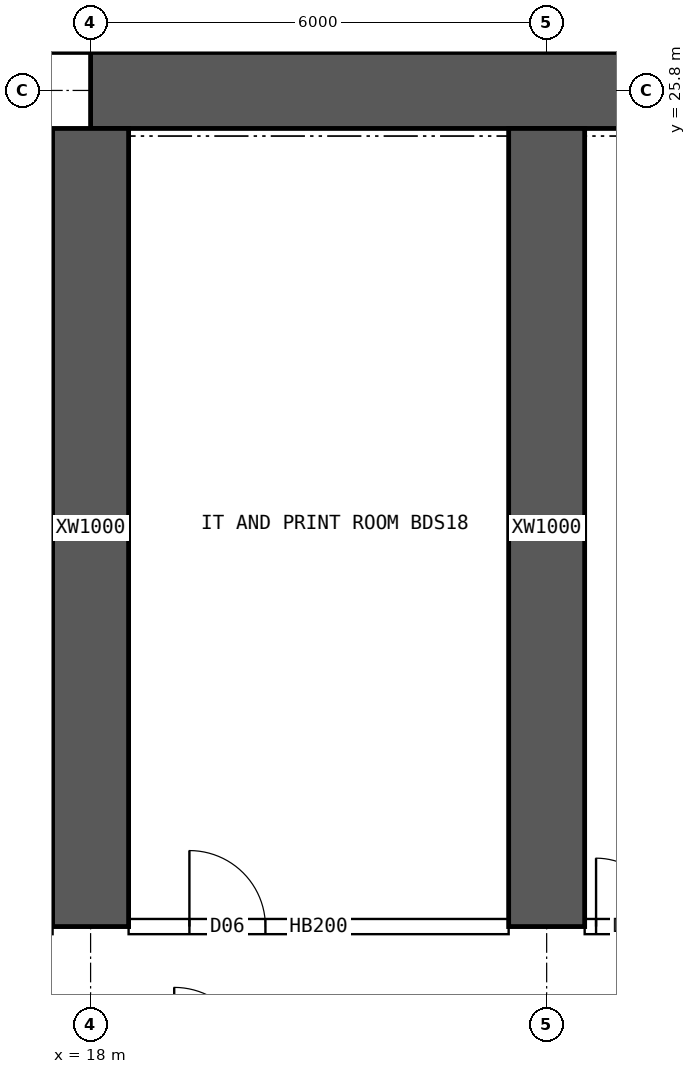
"""IFC4 building model, lengths in metres.
Left out: names, types, materials, properties, quantities, classifications, styles, units other than length and angle.
Written with IfcOpenShell. Run it as: python <this file> out.ifc"""

import sys

from ifc_helpers import new_model, si_unit, direction, frame, frame_2d, origin, place, context, subcontext, project, spatial, rectangle, extrude, element, fill, save


model = new_model("IFC4")
c1 = context("Model", 3, precision=1e-05, world=origin(), true_north=direction((0.0, 1.0)))
c2 = subcontext(c1, "Body", "Model", "MODEL_VIEW")
j1 = project(units=[si_unit("LENGTHUNIT", "METRE"), si_unit("PLANEANGLEUNIT", "RADIAN")], contexts=[c1])
p1 = place(None, origin())
s1 = spatial("IfcSite", under=j1, at=p1, CompositionType="ELEMENT")
p2 = place(p1, origin())
s2 = spatial("IfcBuilding", under=s1, at=p2, CompositionType="ELEMENT")
p3 = place(p2, frame((0.0, 0.0, 42.7)))
s3 = spatial("IfcBuildingStorey", under=s2, at=p3, CompositionType="ELEMENT", Elevation=42.7)
p4 = place(p3, frame((18.0, 25.8, 0.0), z_axis=(0.0, 0.0, 1.0), x_axis=(1.0, 0.0, 0.0)))
e1 = element("IfcWall", 1, at=p4, inside=s3, PredefinedType="SHEAR", context=c2, shape_type="SweptSolid", body=[
    extrude(rectangle(XDim=48.0, YDim=1.0, at=frame_2d((24.0, 0.0))), origin(), (0.0, 0.0, 1.0), 3.75),
])
for number, where, z_axis, x_axis in (
    (2, (18.0, 14.8, 0.0), (0.0, 0.0, 1.0), (0.0, 1.0, 0.0)),
    (3, (24.0, 14.8, 0.0), (0.0, 0.0, 1.0), (0.0, 1.0, 0.0)),
):
    element("IfcWall", number, at=place(p3, frame(where, z_axis=z_axis, x_axis=x_axis)), inside=s3, PredefinedType="SHEAR", context=c2, shape_type="SweptSolid", body=[
        extrude(rectangle(XDim=10.5, YDim=1.0, at=frame_2d((5.25, 0.0))), origin(), (0.0, 0.0, 1.0), 3.75),
    ])
p5 = place(p3, frame((18.5, 14.8, 0.0), z_axis=(0.0, 0.0, 1.0), x_axis=(1.0, 0.0, 0.0)))
e4 = element("IfcWall", 4, at=p5, inside=s3, PredefinedType="SOLIDWALL", context=c2, shape_type="SweptSolid", body=[
    extrude(rectangle(XDim=5.0, YDim=0.2, at=frame_2d((2.5, 0.0))), origin(), (0.0, 0.0, 1.0), 3.5),
])
p6 = place(p5, frame((0.8, 0.0, 0.0)))
e5 = element("IfcOpeningElement", 5, at=p6, cuts=e4, PredefinedType="OPENING", context=c2, shape_type="SweptSolid", body=[
    extrude(rectangle(XDim=1.0, YDim=2.1, at=frame_2d((0.5, 1.05))), frame((0.0, 0.11, 0.0), z_axis=(0.0, -1.0, 0.0), x_axis=(1.0, 0.0, 0.0)), (0.0, 0.0, 1.0), 0.22),
])
p7 = place(p3, frame((24.5, 14.8, 0.0), z_axis=(0.0, 0.0, 1.0), x_axis=(1.0, 0.0, 0.0)))
e6 = element("IfcWall", 6, at=p7, inside=s3, PredefinedType="SOLIDWALL", context=c2, shape_type="SweptSolid", body=[
    extrude(rectangle(XDim=5.0, YDim=0.2, at=frame_2d((2.5, 0.0))), origin(), (0.0, 0.0, 1.0), 3.5),
])
p8 = place(p7, frame((0.15, 0.0, 0.0)))
e7 = element("IfcOpeningElement", 7, at=p8, cuts=e6, PredefinedType="OPENING", context=c2, shape_type="SweptSolid", body=[
    extrude(rectangle(XDim=0.9, YDim=2.1, at=frame_2d((0.45, 1.05))), frame((0.0, 0.11, 0.0), z_axis=(0.0, -1.0, 0.0), x_axis=(1.0, 0.0, 0.0)), (0.0, 0.0, 1.0), 0.22),
])
p9 = place(p7, frame((2.74, 0.0, 0.0)))
e8 = element("IfcOpeningElement", 8, at=p9, cuts=e6, PredefinedType="OPENING", context=c2, shape_type="SweptSolid", body=[
    extrude(rectangle(XDim=0.9, YDim=2.1, at=frame_2d((0.45, 1.05))), frame((0.0, 0.11, 0.0), z_axis=(0.0, -1.0, 0.0), x_axis=(1.0, 0.0, 0.0)), (0.0, 0.0, 1.0), 0.22),
])
p10 = place(p6, origin())
e9 = element("IfcDoor", 9, at=p10, inside=s3, OperationType="SINGLE_SWING_LEFT", PredefinedType="DOOR", context=c2, shape_type="SweptSolid", body=[
    extrude(rectangle(XDim=1.0, YDim=2.1, at=frame_2d((0.5, 1.05))), frame((0.0, 0.025, 0.0), z_axis=(0.0, -1.0, 0.0), x_axis=(1.0, 0.0, 0.0)), (0.0, 0.0, 1.0), 0.05),
])
fill(e5, e9)
p11 = place(p8, origin())
e10 = element("IfcDoor", 10, at=p11, inside=s3, OperationType="SINGLE_SWING_LEFT", PredefinedType="DOOR", context=c2, shape_type="SweptSolid", body=[
    extrude(rectangle(XDim=0.9, YDim=2.1, at=frame_2d((0.45, 1.05))), frame((0.0, 0.025, 0.0), z_axis=(0.0, -1.0, 0.0), x_axis=(1.0, 0.0, 0.0)), (0.0, 0.0, 1.0), 0.05),
])
fill(e7, e10)
save(model, sys.argv[1])
